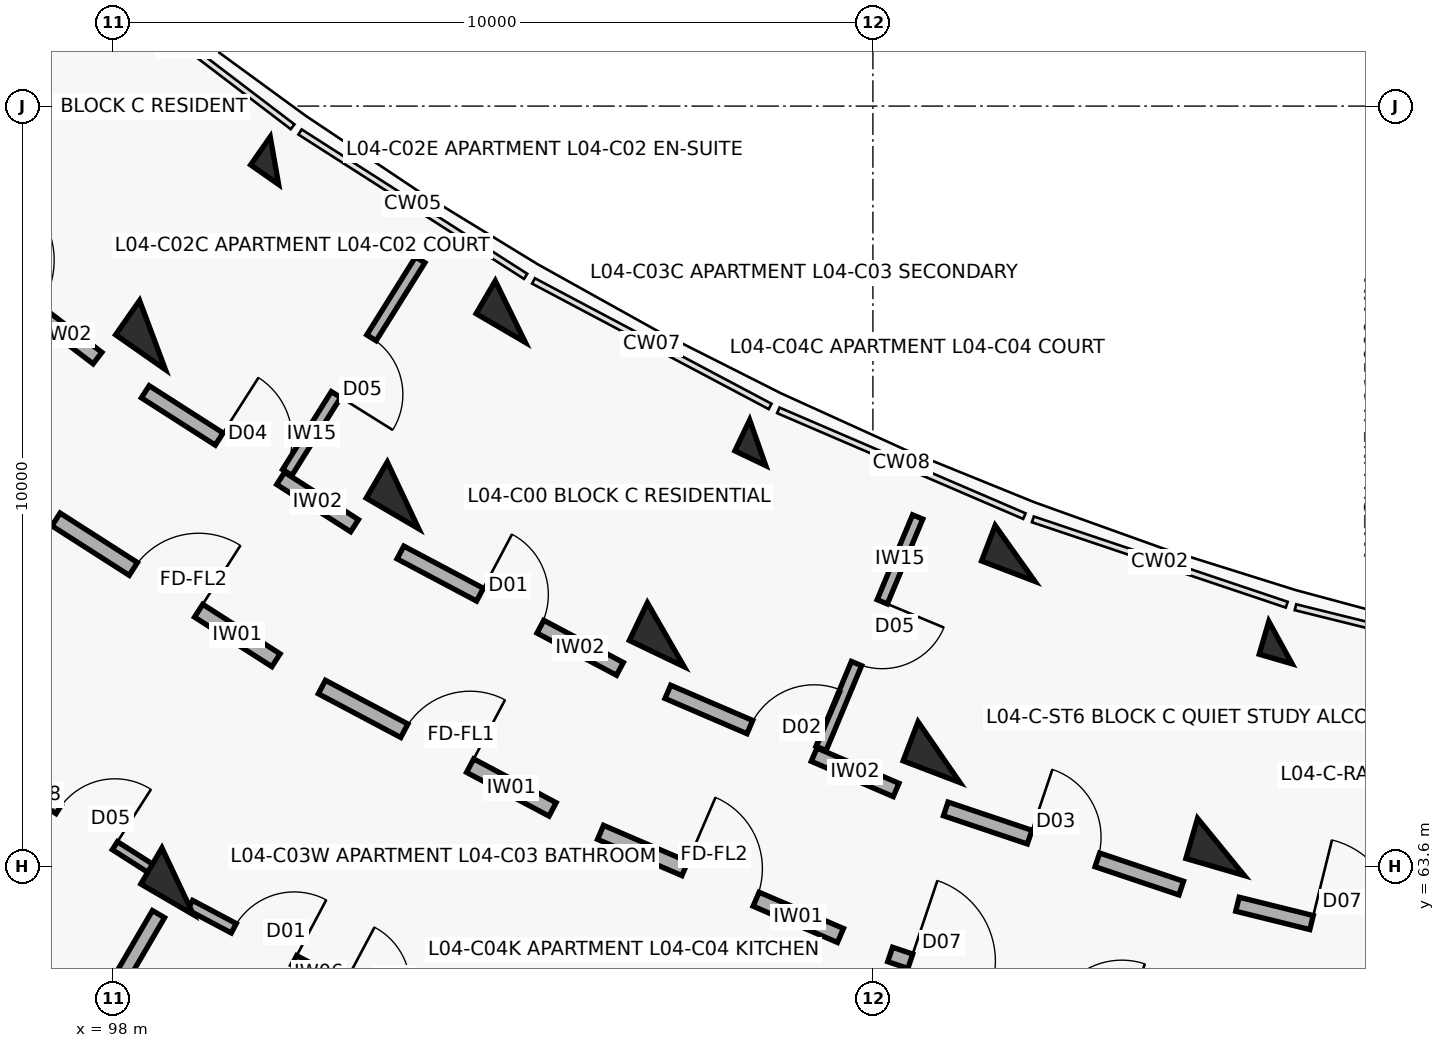
"""IFC4 building model, lengths in metres.
Left out: names, types, materials, properties, quantities, classifications, styles, units other than length and angle.
Written with IfcOpenShell. Run it as: python <this file> out.ifc"""

import sys

from ifc_helpers import new_model, si_unit, direction, frame, frame_2d, origin, origin_2d, place, context, subcontext, project, spatial, rectangle, extrude, element, fill, save


model = new_model("IFC4")
c1 = context("Model", 3, precision=1e-05, world=origin(), true_north=direction((0.0, 1.0)))
c2 = subcontext(c1, "Body", "Model", "MODEL_VIEW")
j1 = project(units=[si_unit("LENGTHUNIT", "METRE"), si_unit("PLANEANGLEUNIT", "RADIAN")], contexts=[c1])
p1 = place(None, origin())
s1 = spatial("IfcSite", under=j1, at=p1, CompositionType="ELEMENT")
p2 = place(p1, origin())
s2 = spatial("IfcBuilding", under=s1, at=p2, CompositionType="ELEMENT")
p3 = place(p2, frame((0.0, 0.0, 14.3)))
s3 = spatial("IfcBuildingStorey", under=s2, at=p3, CompositionType="ELEMENT", Elevation=14.3)
p4 = place(p3, frame((100.126, 72.882, 0.0), z_axis=(0.0, 0.0, 1.0), x_axis=(-0.573004420611, -0.819552276527, 0.0)))
e1 = element("IfcColumn", 1, at=p4, inside=s3, PredefinedType="COLUMN", context=c2, shape_type="SweptSolid", body=[
    extrude(rectangle(XDim=0.45, YDim=0.45, at=origin_2d()), origin(), (0.0, 0.0, 1.0), 3.1),
])
p5 = place(p3, frame((98.522, 70.587, 0.0), z_axis=(0.0, 0.0, 1.0), x_axis=(-0.573004420611, -0.819552276527, 0.0)))
e2 = element("IfcColumn", 2, at=p5, inside=s3, PredefinedType="COLUMN", context=c2, shape_type="SweptSolid", body=[
    extrude(rectangle(XDim=0.55, YDim=0.8, at=origin_2d()), origin(), (0.0, 0.0, 1.0), 3.1),
])
p6 = place(p3, frame((103.229, 70.896, 0.0), z_axis=(0.0, 0.0, 1.0), x_axis=(-0.504226211181, -0.863571611366, 0.0)))
e3 = element("IfcColumn", 3, at=p6, inside=s3, PredefinedType="COLUMN", context=c2, shape_type="SweptSolid", body=[
    extrude(rectangle(XDim=0.5, YDim=0.75, at=origin_2d()), origin(), (0.0, 0.0, 1.0), 3.1),
])
for number, where, z_axis, x_axis in (
    (4, (101.817, 68.478, 0.0), (0.0, 0.0, 1.0), (-0.504, -0.864, 0.0)),
    (5, (98.853, 63.4, 0.0), (0.0, 0.0, 1.0), (-0.504, -0.864, 0.0)),
):
    element("IfcColumn", number, at=place(p3, frame(where, z_axis=z_axis, x_axis=x_axis)), inside=s3, PredefinedType="COLUMN", context=c2, shape_type="SweptSolid", body=[
        extrude(rectangle(XDim=0.55, YDim=0.8, at=origin_2d()), origin(), (0.0, 0.0, 1.0), 3.1),
    ])
p7 = place(p3, frame((106.484, 69.169, 0.0), z_axis=(0.0, 0.0, 1.0), x_axis=(-0.432085748802, -0.901832526405, 0.0)))
e6 = element("IfcColumn", 6, at=p7, inside=s3, PredefinedType="COLUMN", context=c2, shape_type="SweptSolid", body=[
    extrude(rectangle(XDim=0.45, YDim=0.45, at=origin_2d()), origin(), (0.0, 0.0, 1.0), 3.1),
])
p8 = place(p3, frame((105.274, 66.644, 0.0), z_axis=(0.0, 0.0, 1.0), x_axis=(-0.432085748802, -0.901832526405, 0.0)))
e7 = element("IfcColumn", 7, at=p8, inside=s3, PredefinedType="COLUMN", context=c2, shape_type="SweptSolid", body=[
    extrude(rectangle(XDim=0.55, YDim=0.8, at=origin_2d()), origin(), (0.0, 0.0, 1.0), 3.1),
])
p9 = place(p3, frame((109.869, 67.714, 0.0), z_axis=(0.0, 0.0, 1.0), x_axis=(-0.357064076459, -0.934079892355, 0.0)))
e8 = element("IfcColumn", 8, at=p9, inside=s3, PredefinedType="COLUMN", context=c2, shape_type="SweptSolid", body=[
    extrude(rectangle(XDim=0.5, YDim=0.75, at=origin_2d()), origin(), (0.0, 0.0, 1.0), 3.1),
])
p10 = place(p3, frame((108.869, 65.099, 0.0), z_axis=(0.0, 0.0, 1.0), x_axis=(-0.357064076459, -0.934079892355, 0.0)))
e9 = element("IfcColumn", 9, at=p10, inside=s3, PredefinedType="COLUMN", context=c2, shape_type="SweptSolid", body=[
    extrude(rectangle(XDim=0.55, YDim=0.8, at=origin_2d()), origin(), (0.0, 0.0, 1.0), 3.1),
])
p11 = place(p3, frame((113.362, 66.54, 0.0), z_axis=(0.0, 0.0, 1.0), x_axis=(-0.27966144946, -0.96009867914, 0.0)))
e10 = element("IfcColumn", 10, at=p11, inside=s3, PredefinedType="COLUMN", context=c2, shape_type="SweptSolid", body=[
    extrude(rectangle(XDim=0.45, YDim=0.45, at=origin_2d()), origin(), (0.0, 0.0, 1.0), 3.1),
])
p12 = place(p3, frame((112.579, 63.852, 0.0), z_axis=(0.0, 0.0, 1.0), x_axis=(-0.27966144946, -0.96009867914, 0.0)))
e11 = element("IfcColumn", 11, at=p12, inside=s3, PredefinedType="COLUMN", context=c2, shape_type="SweptSolid", body=[
    extrude(rectangle(XDim=0.55, YDim=0.8, at=origin_2d()), origin(), (0.0, 0.0, 1.0), 3.1),
])
p13 = place(p3, frame((95.309, 72.18, 0.0), z_axis=(0.0, 0.0, 1.0), x_axis=(0.795463961918, -0.606000895453, 0.0)))
e12 = element("IfcWall", 12, at=p13, inside=s3, PredefinedType="SOLIDWALL", context=c2, shape_type="SweptSolid", body=[
    extrude(rectangle(XDim=3.129, YDim=0.19, at=frame_2d((1.564, 0.0))), origin(), (0.0, 0.0, 1.0), 2.08),
])
p14 = place(p13, frame((1.004, 0.0, 0.0)))
e13 = element("IfcOpeningElement", 13, at=p14, cuts=e12, PredefinedType="OPENING", context=c2, shape_type="SweptSolid", body=[
    extrude(rectangle(XDim=1.12, YDim=2.15, at=frame_2d((0.56, 1.075))), frame((0.0, 0.105, 0.0), z_axis=(0.0, -1.0, 0.0), x_axis=(1.0, 0.0, 0.0)), (0.0, 0.0, 1.0), 0.21),
])
p15 = place(p3, frame((97.252, 68.161, 0.0), z_axis=(0.0, 0.0, 1.0), x_axis=(0.842289466461, -0.53902546757, 0.0)))
e14 = element("IfcWall", 14, at=p15, inside=s3, PredefinedType="SOLIDWALL", context=c2, shape_type="SweptSolid", body=[
    extrude(rectangle(XDim=3.436, YDim=0.2, at=frame_2d((1.718, 0.0))), origin(), (0.0, 0.0, 1.0), 2.08),
])
p16 = place(p15, frame((1.208, 0.0, 0.0)))
e15 = element("IfcOpeningElement", 15, at=p16, cuts=e14, PredefinedType="OPENING", context=c2, shape_type="SweptSolid", body=[
    extrude(rectangle(XDim=1.02, YDim=2.15, at=frame_2d((0.51, 1.075))), frame((0.0, 0.11, 0.0), z_axis=(0.0, -1.0, 0.0), x_axis=(1.0, 0.0, 0.0)), (0.0, 0.0, 1.0), 0.22),
])
p17 = place(p3, frame((98.427, 69.841, 0.0), z_axis=(0.0, 0.0, 1.0), x_axis=(0.842280895761, -0.539038860043, 0.0)))
e16 = element("IfcWall", 16, at=p17, inside=s3, PredefinedType="SOLIDWALL", context=c2, shape_type="SweptSolid", body=[
    extrude(rectangle(XDim=3.269, YDim=0.19, at=frame_2d((1.634, 0.0))), origin(), (0.0, 0.0, 1.0), 2.08),
])
p18 = place(p17, frame((1.154, 0.0, 0.0)))
e17 = element("IfcOpeningElement", 17, at=p18, cuts=e16, PredefinedType="OPENING", context=c2, shape_type="SweptSolid", body=[
    extrude(rectangle(XDim=0.96, YDim=2.1, at=frame_2d((0.48, 1.05))), frame((0.0, 0.105, 0.0), z_axis=(0.0, -1.0, 0.0), x_axis=(1.0, 0.0, 0.0)), (0.0, 0.0, 1.0), 0.21),
])
p19 = place(p3, frame((102.044, 71.577, 0.0), z_axis=(0.0, 0.0, 1.0), x_axis=(-0.53015188203, -0.847902696057, 0.0)))
e18 = element("IfcWall", 18, at=p19, inside=s3, PredefinedType="PARTITIONING", context=c2, shape_type="SweptSolid", body=[
    extrude(rectangle(XDim=3.3, YDim=0.145, at=frame_2d((1.65, 0.0))), origin(), (0.0, 0.0, 1.0), 2.08),
])
p20 = place(p19, frame((1.21, 0.0, 0.0)))
e19 = element("IfcOpeningElement", 19, at=p20, cuts=e18, PredefinedType="OPENING", context=c2, shape_type="SweptSolid", body=[
    extrude(rectangle(XDim=0.88, YDim=2.1, at=frame_2d((0.44, 1.05))), frame((0.0, 0.083, 0.0), z_axis=(0.0, -1.0, 0.0), x_axis=(1.0, 0.0, 0.0)), (0.0, 0.0, 1.0), 0.165),
])
p21 = place(p3, frame((95.376, 65.565, 0.0), z_axis=(0.0, 0.0, 1.0), x_axis=(0.842242208372, -0.539099306656, 0.0)))
e20 = element("IfcWall", 20, at=p21, inside=s3, PredefinedType="PARTITIONING", context=c2, shape_type="SweptSolid", body=[
    extrude(rectangle(XDim=3.797, YDim=0.125, at=frame_2d((1.899, 0.0))), origin(), (0.0, 0.0, 1.0), 2.08),
])
p22 = place(p21, frame((0.65, 0.0, 0.0)))
e21 = element("IfcOpeningElement", 21, at=p22, cuts=e20, PredefinedType="OPENING", context=c2, shape_type="SweptSolid", body=[
    extrude(rectangle(XDim=0.9, YDim=2.1, at=frame_2d((0.45, 1.05))), frame((0.0, 0.073, 0.0), z_axis=(0.0, -1.0, 0.0), x_axis=(1.0, 0.0, 0.0)), (0.0, 0.0, 1.0), 0.145),
])
p23 = place(p21, frame((2.267, 0.0, 0.0)))
e22 = element("IfcOpeningElement", 22, at=p23, cuts=e20, PredefinedType="OPENING", context=c2, shape_type="SweptSolid", body=[
    extrude(rectangle(XDim=0.88, YDim=2.1, at=frame_2d((0.44, 1.05))), frame((0.0, 0.073, 0.0), z_axis=(0.0, -1.0, 0.0), x_axis=(1.0, 0.0, 0.0)), (0.0, 0.0, 1.0), 0.145),
])
p24 = place(p3, frame((100.75, 65.956, 0.0), z_axis=(0.0, 0.0, 1.0), x_axis=(0.883440266101, -0.468543803963, 0.0)))
e23 = element("IfcWall", 23, at=p24, inside=s3, PredefinedType="SOLIDWALL", context=c2, shape_type="SweptSolid", body=[
    extrude(rectangle(XDim=3.436, YDim=0.2, at=frame_2d((1.718, 0.0))), origin(), (0.0, 0.0, 1.0), 2.08),
])
p25 = place(p24, frame((1.228, 0.0, 0.0)))
e24 = element("IfcOpeningElement", 24, at=p25, cuts=e23, PredefinedType="OPENING", context=c2, shape_type="SweptSolid", body=[
    extrude(rectangle(XDim=0.98, YDim=2.15, at=frame_2d((0.49, 1.075))), frame((0.0, 0.11, 0.0), z_axis=(0.0, -1.0, 0.0), x_axis=(1.0, 0.0, 0.0)), (0.0, 0.0, 1.0), 0.22),
])
p26 = place(p3, frame((101.784, 67.726, 0.0), z_axis=(0.0, 0.0, 1.0), x_axis=(0.883444301944, -0.468536194293, 0.0)))
e25 = element("IfcWall", 25, at=p26, inside=s3, PredefinedType="SOLIDWALL", context=c2, shape_type="SweptSolid", body=[
    extrude(rectangle(XDim=3.269, YDim=0.19, at=frame_2d((1.634, 0.0))), origin(), (0.0, 0.0, 1.0), 2.08),
])
p27 = place(p26, frame((1.184, 0.0, 0.0)))
e26 = element("IfcOpeningElement", 26, at=p27, cuts=e25, PredefinedType="OPENING", context=c2, shape_type="SweptSolid", body=[
    extrude(rectangle(XDim=0.9, YDim=2.1, at=frame_2d((0.45, 1.05))), frame((0.0, 0.105, 0.0), z_axis=(0.0, -1.0, 0.0), x_axis=(1.0, 0.0, 0.0)), (0.0, 0.0, 1.0), 0.21),
])
p28 = place(p3, frame((99.017, 63.087, 0.0), z_axis=(0.0, 0.0, 1.0), x_axis=(0.883415075746, -0.468591297342, 0.0)))
e27 = element("IfcWall", 27, at=p28, inside=s3, PredefinedType="PARTITIONING", context=c2, shape_type="SweptSolid", body=[
    extrude(rectangle(XDim=3.81, YDim=0.14, at=frame_2d((1.905, 0.0))), origin(), (0.0, 0.0, 1.0), 2.08),
])
p29 = place(p28, frame((0.65, 0.0, 0.0)))
e28 = element("IfcOpeningElement", 28, at=p29, cuts=e27, PredefinedType="OPENING", context=c2, shape_type="SweptSolid", body=[
    extrude(rectangle(XDim=0.9, YDim=2.1, at=frame_2d((0.45, 1.05))), frame((0.0, 0.08, 0.0), z_axis=(0.0, -1.0, 0.0), x_axis=(1.0, 0.0, 0.0)), (0.0, 0.0, 1.0), 0.16),
])
p30 = place(p28, frame((2.28, 0.0, 0.0)))
e29 = element("IfcOpeningElement", 29, at=p30, cuts=e27, PredefinedType="OPENING", context=c2, shape_type="SweptSolid", body=[
    extrude(rectangle(XDim=0.88, YDim=2.1, at=frame_2d((0.44, 1.05))), frame((0.0, 0.08, 0.0), z_axis=(0.0, -1.0, 0.0), x_axis=(1.0, 0.0, 0.0)), (0.0, 0.0, 1.0), 0.16),
])
p31 = place(p3, frame((98.601, 62.968, 0.0), z_axis=(0.0, 0.0, 1.0), x_axis=(-0.504216452091, -0.863577309475, 0.0)))
e30 = element("IfcWall", 30, at=p31, inside=s3, PredefinedType="SOLIDWALL", context=c2, shape_type="SweptSolid", body=[
    extrude(rectangle(XDim=4.35, YDim=0.185, at=frame_2d((2.175, 0.0))), origin(), (0.0, 0.0, 1.0), 2.08),
])
p32 = place(p3, frame((104.417, 64.044, 0.0), z_axis=(0.0, 0.0, 1.0), x_axis=(0.918718172399, -0.394913813008, 0.0)))
e31 = element("IfcWall", 31, at=p32, inside=s3, PredefinedType="SOLIDWALL", context=c2, shape_type="SweptSolid", body=[
    extrude(rectangle(XDim=3.436, YDim=0.2, at=frame_2d((1.718, 0.0))), origin(), (0.0, 0.0, 1.0), 2.08),
])
p33 = place(p32, frame((1.208, 0.0, 0.0)))
e32 = element("IfcOpeningElement", 32, at=p33, cuts=e31, PredefinedType="OPENING", context=c2, shape_type="SweptSolid", body=[
    extrude(rectangle(XDim=1.02, YDim=2.15, at=frame_2d((0.51, 1.075))), frame((0.0, 0.11, 0.0), z_axis=(0.0, -1.0, 0.0), x_axis=(1.0, 0.0, 0.0)), (0.0, 0.0, 1.0), 0.22),
])
p34 = place(p3, frame((105.302, 65.893, 0.0), z_axis=(0.0, 0.0, 1.0), x_axis=(0.918723391052, -0.394901672235, 0.0)))
e33 = element("IfcWall", 33, at=p34, inside=s3, PredefinedType="SOLIDWALL", context=c2, shape_type="SweptSolid", body=[
    extrude(rectangle(XDim=3.269, YDim=0.19, at=frame_2d((1.634, 0.0))), origin(), (0.0, 0.0, 1.0), 2.08),
])
p35 = place(p34, frame((1.174, 0.0, 0.0)))
e34 = element("IfcOpeningElement", 34, at=p35, cuts=e33, PredefinedType="OPENING", context=c2, shape_type="SweptSolid", body=[
    extrude(rectangle(XDim=0.92, YDim=2.1, at=frame_2d((0.46, 1.05))), frame((0.0, 0.105, 0.0), z_axis=(0.0, -1.0, 0.0), x_axis=(1.0, 0.0, 0.0)), (0.0, 0.0, 1.0), 0.21),
])
p36 = place(p3, frame((108.589, 68.194, 0.0), z_axis=(0.0, 0.0, 1.0), x_axis=(-0.385151143297, -0.922853507777, 0.0)))
e35 = element("IfcWall", 35, at=p36, inside=s3, PredefinedType="PARTITIONING", context=c2, shape_type="SweptSolid", body=[
    extrude(rectangle(XDim=3.3, YDim=0.145, at=frame_2d((1.65, 0.0))), origin(), (0.0, 0.0, 1.0), 2.08),
])
p37 = place(p36, frame((1.21, 0.0, 0.0)))
e36 = element("IfcOpeningElement", 36, at=p37, cuts=e35, PredefinedType="OPENING", context=c2, shape_type="SweptSolid", body=[
    extrude(rectangle(XDim=0.88, YDim=2.1, at=frame_2d((0.44, 1.05))), frame((0.0, 0.083, 0.0), z_axis=(0.0, -1.0, 0.0), x_axis=(1.0, 0.0, 0.0)), (0.0, 0.0, 1.0), 0.165),
])
p38 = place(p3, frame((108.227, 62.437, 0.0), z_axis=(0.0, 0.0, 1.0), x_axis=(0.947884468821, -0.318614239745, 0.0)))
e37 = element("IfcWall", 37, at=p38, inside=s3, PredefinedType="SOLIDWALL", context=c2, shape_type="SweptSolid", body=[
    extrude(rectangle(XDim=3.436, YDim=0.2, at=frame_2d((1.718, 0.0))), origin(), (0.0, 0.0, 1.0), 2.08),
])
p39 = place(p38, frame((0.28, 0.0, 0.0)))
e38 = element("IfcOpeningElement", 38, at=p39, cuts=e37, PredefinedType="OPENING", context=c2, shape_type="SweptSolid", body=[
    extrude(rectangle(XDim=1.12, YDim=2.15, at=frame_2d((0.56, 1.075))), frame((0.0, 0.11, 0.0), z_axis=(0.0, -1.0, 0.0), x_axis=(1.0, 0.0, 0.0)), (0.0, 0.0, 1.0), 0.22),
])
p40 = place(p38, frame((2.266, 0.0, 0.0)))
e39 = element("IfcOpeningElement", 39, at=p40, cuts=e37, PredefinedType="OPENING", context=c2, shape_type="SweptSolid", body=[
    extrude(rectangle(XDim=0.95, YDim=2.1, at=frame_2d((0.475, 1.05))), frame((0.0, 0.11, 0.0), z_axis=(0.0, -1.0, 0.0), x_axis=(1.0, 0.0, 0.0)), (0.0, 0.0, 1.0), 0.22),
])
p41 = place(p3, frame((108.958, 64.352, 0.0), z_axis=(0.0, 0.0, 1.0), x_axis=(0.94787351033, -0.318646839643, 0.0)))
e40 = element("IfcWall", 40, at=p41, inside=s3, PredefinedType="SOLIDWALL", context=c2, shape_type="SweptSolid", body=[
    extrude(rectangle(XDim=3.269, YDim=0.19, at=frame_2d((1.634, 0.0))), origin(), (0.0, 0.0, 1.0), 2.08),
])
p42 = place(p41, frame((1.164, 0.0, 0.0)))
e41 = element("IfcOpeningElement", 41, at=p42, cuts=e40, PredefinedType="OPENING", context=c2, shape_type="SweptSolid", body=[
    extrude(rectangle(XDim=0.94, YDim=2.1, at=frame_2d((0.47, 1.05))), frame((0.0, 0.105, 0.0), z_axis=(0.0, -1.0, 0.0), x_axis=(1.0, 0.0, 0.0)), (0.0, 0.0, 1.0), 0.21),
])
p43 = place(p3, frame((112.796, 63.098, 0.0), z_axis=(0.0, 0.0, 1.0), x_axis=(0.970708998014, -0.240258280136, 0.0)))
e42 = element("IfcWall", 42, at=p43, inside=s3, PredefinedType="SOLIDWALL", context=c2, shape_type="SweptSolid", body=[
    extrude(rectangle(XDim=3.129, YDim=0.19, at=frame_2d((1.564, 0.0))), origin(), (0.0, 0.0, 1.0), 2.08),
])
p44 = place(p43, frame((1.004, 0.0, 0.0)))
e43 = element("IfcOpeningElement", 43, at=p44, cuts=e42, PredefinedType="OPENING", context=c2, shape_type="SweptSolid", body=[
    extrude(rectangle(XDim=1.12, YDim=2.15, at=frame_2d((0.56, 1.075))), frame((0.0, 0.105, 0.0), z_axis=(0.0, -1.0, 0.0), x_axis=(1.0, 0.0, 0.0)), (0.0, 0.0, 1.0), 0.21),
])
p45 = place(p16, origin())
e44 = element("IfcDoor", 44, at=p45, inside=s3, OperationType="SINGLE_SWING_RIGHT", PredefinedType="DOOR", context=c2, shape_type="SweptSolid", body=[
    extrude(rectangle(XDim=1.02, YDim=2.15, at=frame_2d((0.51, 1.075))), frame((0.0, 0.025, 0.0), z_axis=(0.0, -1.0, 0.0), x_axis=(1.0, 0.0, 0.0)), (0.0, 0.0, 1.0), 0.05),
])
fill(e15, e44)
p46 = place(p18, origin())
e45 = element("IfcDoor", 45, at=p46, inside=s3, OperationType="SINGLE_SWING_LEFT", PredefinedType="DOOR", context=c2, shape_type="SweptSolid", body=[
    extrude(rectangle(XDim=0.96, YDim=2.1, at=frame_2d((0.48, 1.05))), frame((0.0, 0.025, 0.0), z_axis=(0.0, -1.0, 0.0), x_axis=(1.0, 0.0, 0.0)), (0.0, 0.0, 1.0), 0.05),
])
fill(e17, e45)
p47 = place(p20, origin())
e46 = element("IfcDoor", 46, at=p47, inside=s3, OperationType="SINGLE_SWING_RIGHT", PredefinedType="DOOR", context=c2, shape_type="SweptSolid", body=[
    extrude(rectangle(XDim=0.88, YDim=2.1, at=frame_2d((0.44, 1.05))), frame((0.0, 0.025, 0.0), z_axis=(0.0, -1.0, 0.0), x_axis=(1.0, 0.0, 0.0)), (0.0, 0.0, 1.0), 0.05),
])
fill(e19, e46)
p48 = place(p23, origin())
e47 = element("IfcDoor", 47, at=p48, inside=s3, OperationType="SINGLE_SWING_RIGHT", PredefinedType="DOOR", context=c2, shape_type="SweptSolid", body=[
    extrude(rectangle(XDim=0.88, YDim=2.1, at=frame_2d((0.44, 1.05))), frame((0.0, 0.025, 0.0), z_axis=(0.0, -1.0, 0.0), x_axis=(1.0, 0.0, 0.0)), (0.0, 0.0, 1.0), 0.05),
])
fill(e22, e47)
p49 = place(p25, origin())
e48 = element("IfcDoor", 48, at=p49, inside=s3, OperationType="SINGLE_SWING_RIGHT", PredefinedType="DOOR", context=c2, shape_type="SweptSolid", body=[
    extrude(rectangle(XDim=0.98, YDim=2.15, at=frame_2d((0.49, 1.075))), frame((0.0, 0.025, 0.0), z_axis=(0.0, -1.0, 0.0), x_axis=(1.0, 0.0, 0.0)), (0.0, 0.0, 1.0), 0.05),
])
fill(e24, e48)
p50 = place(p27, origin())
e49 = element("IfcDoor", 49, at=p50, inside=s3, OperationType="SINGLE_SWING_LEFT", PredefinedType="DOOR", context=c2, shape_type="SweptSolid", body=[
    extrude(rectangle(XDim=0.9, YDim=2.1, at=frame_2d((0.45, 1.05))), frame((0.0, 0.025, 0.0), z_axis=(0.0, -1.0, 0.0), x_axis=(1.0, 0.0, 0.0)), (0.0, 0.0, 1.0), 0.05),
])
fill(e26, e49)
p51 = place(p29, origin())
e50 = element("IfcDoor", 50, at=p51, inside=s3, OperationType="SINGLE_SWING_RIGHT", PredefinedType="DOOR", context=c2, shape_type="SweptSolid", body=[
    extrude(rectangle(XDim=0.9, YDim=2.1, at=frame_2d((0.45, 1.05))), frame((0.0, 0.025, 0.0), z_axis=(0.0, -1.0, 0.0), x_axis=(1.0, 0.0, 0.0)), (0.0, 0.0, 1.0), 0.05),
])
fill(e28, e50)
p52 = place(p33, origin())
e51 = element("IfcDoor", 51, at=p52, inside=s3, OperationType="SINGLE_SWING_LEFT", PredefinedType="DOOR", context=c2, shape_type="SweptSolid", body=[
    extrude(rectangle(XDim=1.02, YDim=2.15, at=frame_2d((0.51, 1.075))), frame((0.0, 0.025, 0.0), z_axis=(0.0, -1.0, 0.0), x_axis=(1.0, 0.0, 0.0)), (0.0, 0.0, 1.0), 0.05),
])
fill(e32, e51)
p53 = place(p35, origin())
e52 = element("IfcDoor", 52, at=p53, inside=s3, OperationType="SINGLE_SWING_RIGHT", PredefinedType="DOOR", context=c2, shape_type="SweptSolid", body=[
    extrude(rectangle(XDim=0.92, YDim=2.1, at=frame_2d((0.46, 1.05))), frame((0.0, 0.025, 0.0), z_axis=(0.0, -1.0, 0.0), x_axis=(1.0, 0.0, 0.0)), (0.0, 0.0, 1.0), 0.05),
])
fill(e34, e52)
p54 = place(p37, origin())
e53 = element("IfcDoor", 53, at=p54, inside=s3, OperationType="SINGLE_SWING_LEFT", PredefinedType="DOOR", context=c2, shape_type="SweptSolid", body=[
    extrude(rectangle(XDim=0.88, YDim=2.1, at=frame_2d((0.44, 1.05))), frame((0.0, 0.025, 0.0), z_axis=(0.0, -1.0, 0.0), x_axis=(1.0, 0.0, 0.0)), (0.0, 0.0, 1.0), 0.05),
])
fill(e36, e53)
p55 = place(p39, origin())
e54 = element("IfcDoor", 54, at=p55, inside=s3, OperationType="SINGLE_SWING_LEFT", PredefinedType="DOOR", context=c2, shape_type="SweptSolid", body=[
    extrude(rectangle(XDim=1.12, YDim=2.15, at=frame_2d((0.56, 1.075))), frame((0.0, 0.025, 0.0), z_axis=(0.0, -1.0, 0.0), x_axis=(1.0, 0.0, 0.0)), (0.0, 0.0, 1.0), 0.05),
])
fill(e38, e54)
p56 = place(p42, origin())
e55 = element("IfcDoor", 55, at=p56, inside=s3, OperationType="SINGLE_SWING_LEFT", PredefinedType="DOOR", context=c2, shape_type="SweptSolid", body=[
    extrude(rectangle(XDim=0.94, YDim=2.1, at=frame_2d((0.47, 1.05))), frame((0.0, 0.025, 0.0), z_axis=(0.0, -1.0, 0.0), x_axis=(1.0, 0.0, 0.0)), (0.0, 0.0, 1.0), 0.05),
])
fill(e41, e55)
p57 = place(p44, origin())
e56 = element("IfcDoor", 56, at=p57, inside=s3, OperationType="SINGLE_SWING_LEFT", PredefinedType="DOOR", context=c2, shape_type="SweptSolid", body=[
    extrude(rectangle(XDim=1.12, YDim=2.15, at=frame_2d((0.56, 1.075))), frame((0.0, 0.025, 0.0), z_axis=(0.0, -1.0, 0.0), x_axis=(1.0, 0.0, 0.0)), (0.0, 0.0, 1.0), 0.05),
])
fill(e43, e56)
save(model, sys.argv[1])
